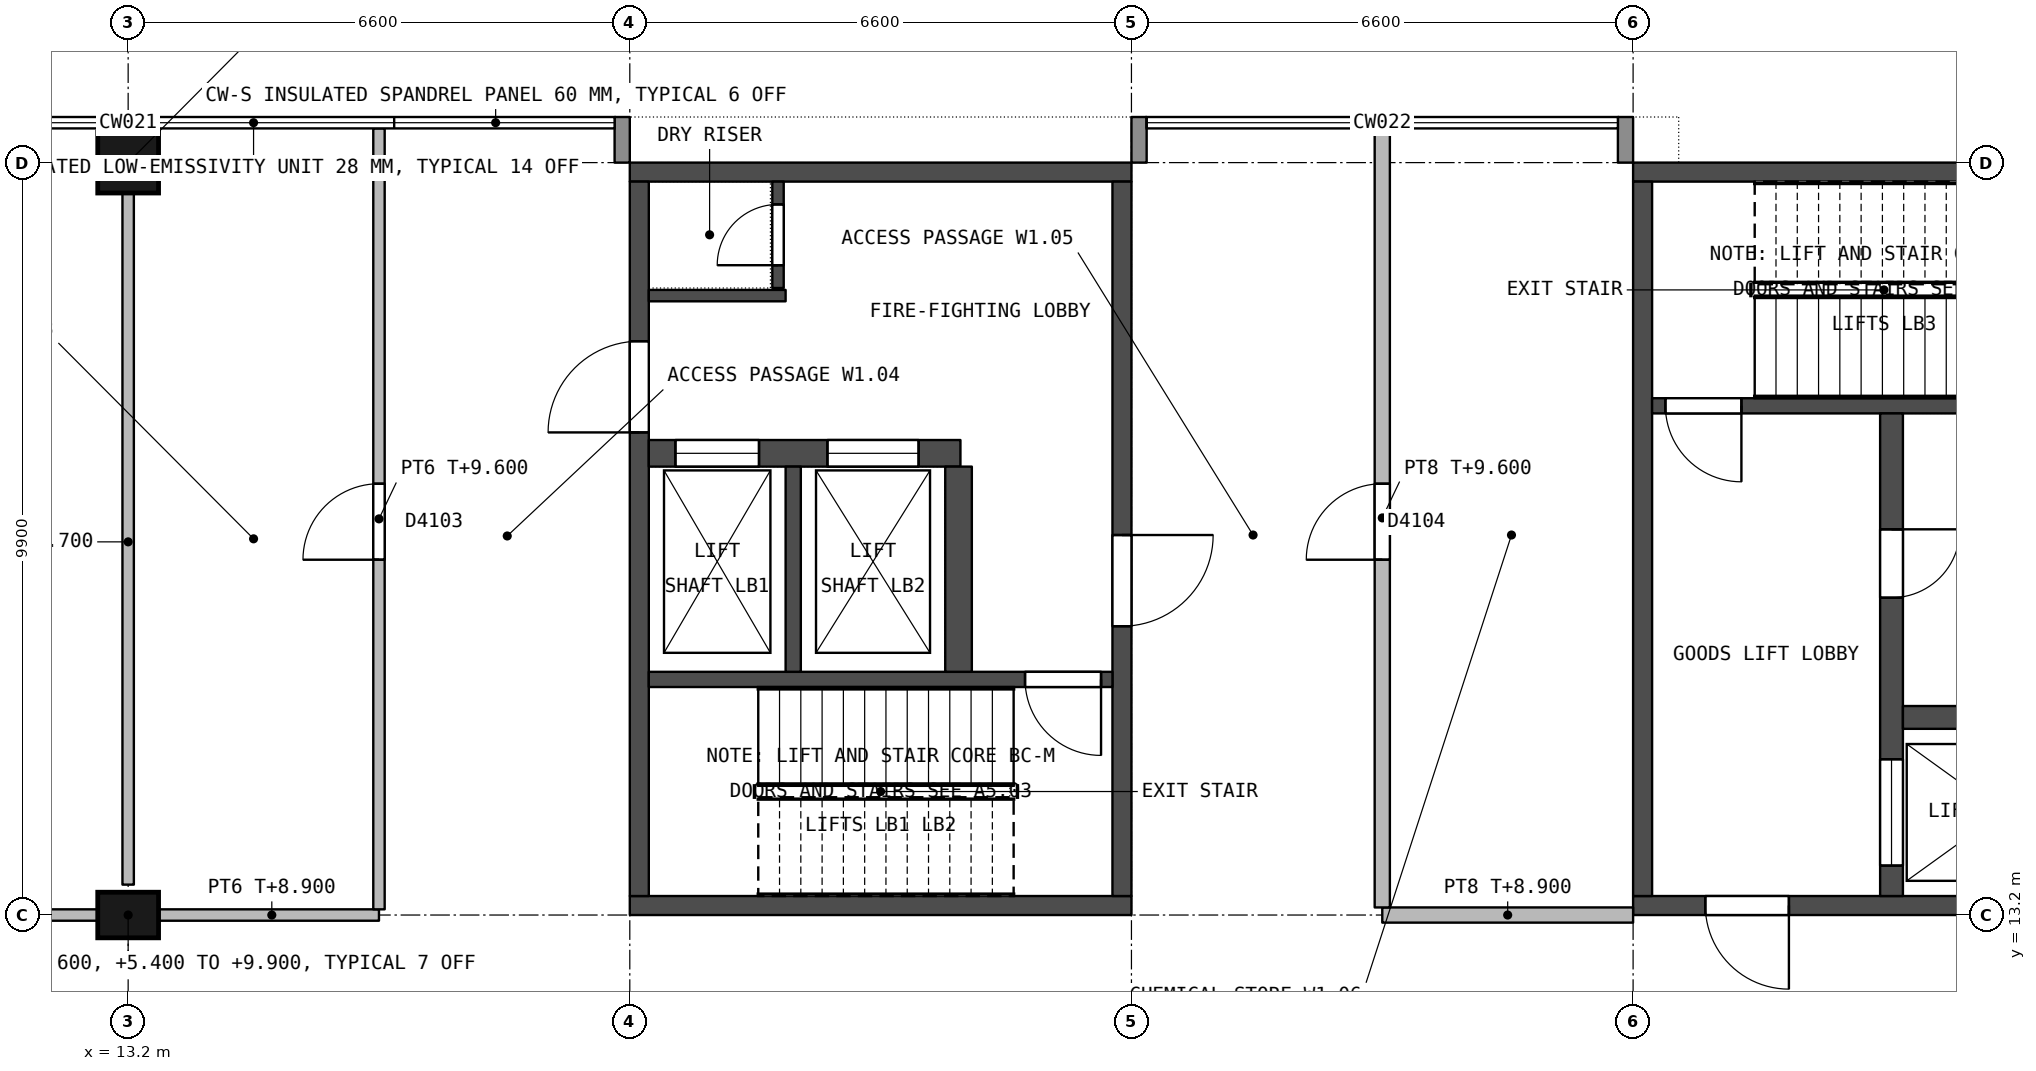
"""IFC4 building model, lengths in metres.
Left out: names, types, materials, properties, quantities, classifications, styles, units other than length and angle.
Written with IfcOpenShell. Run it as: python <this file> out.ifc"""

import sys

from ifc_helpers import new_model, si_unit, direction, frame, frame_2d, origin, origin_2d, place, context, subcontext, project, spatial, rectangle, extrude, element, fill, save


model = new_model("IFC4")
c1 = context("Model", 3, precision=1e-05, world=origin(), true_north=direction((0.0, 1.0)))
c2 = subcontext(c1, "Body", "Model", "MODEL_VIEW")
j1 = project(units=[si_unit("LENGTHUNIT", "METRE"), si_unit("PLANEANGLEUNIT", "RADIAN")], contexts=[c1])
p1 = place(None, origin())
s1 = spatial("IfcSite", under=j1, at=p1, CompositionType="ELEMENT")
p2 = place(p1, origin())
s2 = spatial("IfcBuilding", under=s1, at=p2, CompositionType="ELEMENT")
p3 = place(p2, frame((0.0, 0.0, 5.4)))
s3 = spatial("IfcBuildingStorey", under=s2, at=p3, CompositionType="ELEMENT", Elevation=5.4)
p4 = place(p3, frame((13.2, 13.2, 0.0), z_axis=(0.0, 0.0, 1.0), x_axis=(1.0, 0.0, 0.0)))
e1 = element("IfcColumn", 1, at=p4, inside=s3, PredefinedType="COLUMN", context=c2, shape_type="SweptSolid", body=[
    extrude(rectangle(XDim=0.8, YDim=0.6, at=origin_2d()), origin(), (0.0, 0.0, 1.0), 4.5),
])
p5 = place(p3, frame((13.2, 23.1, 0.0), z_axis=(0.0, 0.0, 1.0), x_axis=(1.0, 0.0, 0.0)))
e2 = element("IfcColumn", 2, at=p5, inside=s3, PredefinedType="COLUMN", context=c2, shape_type="SweptSolid", body=[
    extrude(rectangle(XDim=0.8, YDim=0.8, at=origin_2d()), origin(), (0.0, 0.0, 1.0), 4.5),
])
for number, where, z_axis, x_axis in (
    (3, (19.8, 13.325, 0.0), (0.0, 0.0, 1.0), (1.0, 0.0, 0.0)),
    (4, (19.8, 22.975, 0.0), (0.0, 0.0, 1.0), (1.0, 0.0, 0.0)),
):
    element("IfcWall", number, at=place(p3, frame(where, z_axis=z_axis, x_axis=x_axis)), inside=s3, PredefinedType="SHEAR", context=c2, shape_type="SweptSolid", body=[
        extrude(rectangle(XDim=6.6, YDim=0.25, at=frame_2d((3.3, 0.0))), origin(), (0.0, 0.0, 1.0), 4.2),
    ])
p6 = place(p3, frame((19.925, 13.45, 0.0), z_axis=(0.0, 0.0, 1.0), x_axis=(0.0, 1.0, 0.0)))
e5 = element("IfcWall", 5, at=p6, inside=s3, PredefinedType="SHEAR", context=c2, shape_type="SweptSolid", body=[
    extrude(rectangle(XDim=9.4, YDim=0.25, at=frame_2d((4.7, 0.0))), origin(), (0.0, 0.0, 1.0), 4.2),
])
p7 = place(p6, frame((6.1, 0.0, 0.0)))
e6 = element("IfcOpeningElement", 6, at=p7, cuts=e5, PredefinedType="OPENING", context=c2, shape_type="SweptSolid", body=[
    extrude(rectangle(XDim=1.2, YDim=2.1, at=frame_2d((0.6, 1.05))), frame((0.0, 0.135, 0.0), z_axis=(0.0, -1.0, 0.0), x_axis=(1.0, 0.0, 0.0)), (0.0, 0.0, 1.0), 0.27),
])
p8 = place(p3, frame((26.275, 13.45, 0.0), z_axis=(0.0, 0.0, 1.0), x_axis=(0.0, 1.0, 0.0)))
e7 = element("IfcWall", 7, at=p8, inside=s3, PredefinedType="SHEAR", context=c2, shape_type="SweptSolid", body=[
    extrude(rectangle(XDim=9.4, YDim=0.25, at=frame_2d((4.7, 0.0))), origin(), (0.0, 0.0, 1.0), 4.2),
])
p9 = place(p8, frame((3.55, 0.0, 0.0)))
e8 = element("IfcOpeningElement", 8, at=p9, cuts=e7, PredefinedType="OPENING", context=c2, shape_type="SweptSolid", body=[
    extrude(rectangle(XDim=1.2, YDim=2.1, at=frame_2d((0.6, 1.05))), frame((0.0, 0.135, 0.0), z_axis=(0.0, -1.0, 0.0), x_axis=(1.0, 0.0, 0.0)), (0.0, 0.0, 1.0), 0.27),
])
p10 = place(p3, frame((20.05, 16.3, 0.0), z_axis=(0.0, 0.0, 1.0), x_axis=(1.0, 0.0, 0.0)))
e9 = element("IfcWall", 9, at=p10, inside=s3, PredefinedType="SHEAR", context=c2, shape_type="SweptSolid", body=[
    extrude(rectangle(XDim=6.1, YDim=0.2, at=frame_2d((3.05, 0.0))), origin(), (0.0, 0.0, 1.0), 4.2),
])
p11 = place(p10, frame((4.95, 0.0, 0.0)))
e10 = element("IfcOpeningElement", 10, at=p11, cuts=e9, PredefinedType="OPENING", context=c2, shape_type="SweptSolid", body=[
    extrude(rectangle(XDim=1.0, YDim=2.2, at=frame_2d((0.5, 1.1))), frame((0.0, 0.11, 0.0), z_axis=(0.0, -1.0, 0.0), x_axis=(1.0, 0.0, 0.0)), (0.0, 0.0, 1.0), 0.22),
])
p12 = place(p3, frame((20.05, 19.275, 0.0), z_axis=(0.0, 0.0, 1.0), x_axis=(1.0, 0.0, 0.0)))
e11 = element("IfcWall", 11, at=p12, inside=s3, PredefinedType="SHEAR", context=c2, shape_type="SweptSolid", body=[
    extrude(rectangle(XDim=4.1, YDim=0.35, at=frame_2d((2.05, 0.0))), origin(), (0.0, 0.0, 1.0), 4.2),
])
p13 = place(p12, frame((0.35, 0.0, 0.0)))
e12 = element("IfcOpeningElement", 12, at=p13, cuts=e11, PredefinedType="OPENING", context=c2, shape_type="SweptSolid", body=[
    extrude(rectangle(XDim=1.1, YDim=2.2, at=frame_2d((0.55, 1.1))), frame((0.0, 0.185, 0.0), z_axis=(0.0, -1.0, 0.0), x_axis=(1.0, 0.0, 0.0)), (0.0, 0.0, 1.0), 0.37),
])
p14 = place(p12, frame((2.35, 0.0, 0.0)))
e13 = element("IfcOpeningElement", 13, at=p14, cuts=e11, PredefinedType="OPENING", context=c2, shape_type="SweptSolid", body=[
    extrude(rectangle(XDim=1.2, YDim=2.3, at=frame_2d((0.6, 1.15))), frame((0.0, 0.185, 0.0), z_axis=(0.0, -1.0, 0.0), x_axis=(1.0, 0.0, 0.0)), (0.0, 0.0, 1.0), 0.37),
])
p15 = place(p3, frame((21.95, 16.4, 0.0), z_axis=(0.0, 0.0, 1.0), x_axis=(0.0, 1.0, 0.0)))
e14 = element("IfcWall", 14, at=p15, inside=s3, PredefinedType="SHEAR", context=c2, shape_type="SweptSolid", body=[
    extrude(rectangle(XDim=2.7, YDim=0.2, at=frame_2d((1.35, 0.0))), origin(), (0.0, 0.0, 1.0), 4.2),
])
p16 = place(p3, frame((24.125, 16.4, 0.0), z_axis=(0.0, 0.0, 1.0), x_axis=(0.0, 1.0, 0.0)))
e15 = element("IfcWall", 15, at=p16, inside=s3, PredefinedType="SHEAR", context=c2, shape_type="SweptSolid", body=[
    extrude(rectangle(XDim=2.7, YDim=0.35, at=frame_2d((1.35, 0.0))), origin(), (0.0, 0.0, 1.0), 4.2),
])
p17 = place(p3, frame((20.05, 21.35, 0.0), z_axis=(0.0, 0.0, 1.0), x_axis=(1.0, 0.0, 0.0)))
e16 = element("IfcWall", 16, at=p17, inside=s3, PredefinedType="SHEAR", context=c2, shape_type="SweptSolid", body=[
    extrude(rectangle(XDim=1.8, YDim=0.15, at=frame_2d((0.9, 0.0))), origin(), (0.0, 0.0, 1.0), 4.2),
])
p18 = place(p3, frame((21.75, 21.45, 0.0), z_axis=(0.0, 0.0, 1.0), x_axis=(0.0, 1.0, 0.0)))
e17 = element("IfcWall", 17, at=p18, inside=s3, PredefinedType="SHEAR", context=c2, shape_type="SweptSolid", body=[
    extrude(rectangle(XDim=1.4, YDim=0.15, at=frame_2d((0.7, 0.0))), origin(), (0.0, 0.0, 1.0), 4.2),
])
p19 = place(p18, frame((0.3, 0.0, 0.0)))
e18 = element("IfcOpeningElement", 18, at=p19, cuts=e17, PredefinedType="OPENING", context=c2, shape_type="SweptSolid", body=[
    extrude(rectangle(XDim=0.8, YDim=2.0, at=frame_2d((0.4, 1.0))), frame((0.0, 0.085, 0.0), z_axis=(0.0, -1.0, 0.0), x_axis=(1.0, 0.0, 0.0)), (0.0, 0.0, 1.0), 0.17),
])
p20 = place(p3, frame((33.0, 13.325, 0.0), z_axis=(0.0, 0.0, 1.0), x_axis=(1.0, 0.0, 0.0)))
e19 = element("IfcWall", 19, at=p20, inside=s3, PredefinedType="SHEAR", context=c2, shape_type="SweptSolid", body=[
    extrude(rectangle(XDim=6.6, YDim=0.25, at=frame_2d((3.3, 0.0))), origin(), (0.0, 0.0, 1.0), 4.2),
])
p21 = place(p20, frame((0.95, 0.0, 0.0)))
e20 = element("IfcOpeningElement", 20, at=p21, cuts=e19, PredefinedType="OPENING", context=c2, shape_type="SweptSolid", body=[
    extrude(rectangle(XDim=1.1, YDim=2.1, at=frame_2d((0.55, 1.05))), frame((0.0, 0.135, 0.0), z_axis=(0.0, -1.0, 0.0), x_axis=(1.0, 0.0, 0.0)), (0.0, 0.0, 1.0), 0.27),
])
p22 = place(p3, frame((33.0, 22.975, 0.0), z_axis=(0.0, 0.0, 1.0), x_axis=(1.0, 0.0, 0.0)))
e21 = element("IfcWall", 21, at=p22, inside=s3, PredefinedType="SHEAR", context=c2, shape_type="SweptSolid", body=[
    extrude(rectangle(XDim=6.6, YDim=0.25, at=frame_2d((3.3, 0.0))), origin(), (0.0, 0.0, 1.0), 4.2),
])
p23 = place(p3, frame((33.125, 13.45, 0.0), z_axis=(0.0, 0.0, 1.0), x_axis=(0.0, 1.0, 0.0)))
e22 = element("IfcWall", 22, at=p23, inside=s3, PredefinedType="SHEAR", context=c2, shape_type="SweptSolid", body=[
    extrude(rectangle(XDim=9.4, YDim=0.25, at=frame_2d((4.7, 0.0))), origin(), (0.0, 0.0, 1.0), 4.2),
])
p24 = place(p3, frame((33.25, 19.9, 0.0), z_axis=(0.0, 0.0, 1.0), x_axis=(1.0, 0.0, 0.0)))
e23 = element("IfcWall", 23, at=p24, inside=s3, PredefinedType="SHEAR", context=c2, shape_type="SweptSolid", body=[
    extrude(rectangle(XDim=6.1, YDim=0.2, at=frame_2d((3.05, 0.0))), origin(), (0.0, 0.0, 1.0), 4.2),
])
p25 = place(p24, frame((0.175, 0.0, 0.0)))
e24 = element("IfcOpeningElement", 24, at=p25, cuts=e23, PredefinedType="OPENING", context=c2, shape_type="SweptSolid", body=[
    extrude(rectangle(XDim=1.0, YDim=2.1, at=frame_2d((0.5, 1.05))), frame((0.0, 0.11, 0.0), z_axis=(0.0, -1.0, 0.0), x_axis=(1.0, 0.0, 0.0)), (0.0, 0.0, 1.0), 0.22),
])
p26 = place(p3, frame((36.4, 13.45, 0.0), z_axis=(0.0, 0.0, 1.0), x_axis=(0.0, 1.0, 0.0)))
e25 = element("IfcWall", 25, at=p26, inside=s3, PredefinedType="SHEAR", context=c2, shape_type="SweptSolid", body=[
    extrude(rectangle(XDim=6.35, YDim=0.3, at=frame_2d((3.175, 0.0))), origin(), (0.0, 0.0, 1.0), 4.2),
])
p27 = place(p26, frame((3.925, 0.0, 0.0)))
e26 = element("IfcOpeningElement", 26, at=p27, cuts=e25, PredefinedType="OPENING", context=c2, shape_type="SweptSolid", body=[
    extrude(rectangle(XDim=0.9, YDim=2.1, at=frame_2d((0.45, 1.05))), frame((0.0, 0.16, 0.0), z_axis=(0.0, -1.0, 0.0), x_axis=(1.0, 0.0, 0.0)), (0.0, 0.0, 1.0), 0.32),
])
p28 = place(p26, frame((0.4, 0.0, 0.0)))
e27 = element("IfcOpeningElement", 27, at=p28, cuts=e25, PredefinedType="OPENING", context=c2, shape_type="SweptSolid", body=[
    extrude(rectangle(XDim=1.4, YDim=2.4, at=frame_2d((0.7, 1.2))), frame((0.0, 0.16, 0.0), z_axis=(0.0, -1.0, 0.0), x_axis=(1.0, 0.0, 0.0)), (0.0, 0.0, 1.0), 0.32),
])
p29 = place(p3, frame((36.55, 15.8, 0.0), z_axis=(0.0, 0.0, 1.0), x_axis=(1.0, 0.0, 0.0)))
e28 = element("IfcWall", 28, at=p29, inside=s3, PredefinedType="SHEAR", context=c2, shape_type="SweptSolid", body=[
    extrude(rectangle(XDim=2.8, YDim=0.3, at=frame_2d((1.4, 0.0))), origin(), (0.0, 0.0, 1.0), 4.2),
])
for number, where, z_axis, x_axis in (
    (29, (19.7, 23.1, 0.0), (0.0, 0.0, 1.0), (0.0, 1.0, 0.0)),
    (30, (26.5, 23.1, 0.0), (0.0, 0.0, 1.0), (0.0, 1.0, 0.0)),
    (31, (32.9, 23.1, 0.0), (0.0, 0.0, 1.0), (0.0, 1.0, 0.0)),
):
    element("IfcWall", number, at=place(p3, frame(where, z_axis=z_axis, x_axis=x_axis)), inside=s3, PredefinedType="STANDARD", context=c2, shape_type="SweptSolid", body=[
        extrude(rectangle(XDim=0.6, YDim=0.2, at=frame_2d((0.3, 0.0))), origin(), (0.0, 0.0, 1.0), 3.5),
    ])
p30 = place(p3, frame((12.8, 13.2, 0.0), z_axis=(0.0, 0.0, 1.0), x_axis=(-1.0, 0.0, 0.0)))
e32 = element("IfcWall", 32, at=p30, inside=s3, PredefinedType="PARTITIONING", context=c2, shape_type="SweptSolid", body=[
    extrude(rectangle(XDim=6.2, YDim=0.15, at=frame_2d((3.1, 0.0))), origin(), (0.0, 0.0, 1.0), 3.5),
])
p31 = place(p30, frame((2.15, 0.0, 0.0)))
e33 = element("IfcOpeningElement", 33, at=p31, cuts=e32, PredefinedType="OPENING", context=c2, shape_type="SweptSolid", body=[
    extrude(rectangle(XDim=1.5, YDim=2.1, at=frame_2d((0.75, 1.05))), frame((0.0, 0.085, 0.0), z_axis=(0.0, -1.0, 0.0), x_axis=(1.0, 0.0, 0.0)), (0.0, 0.0, 1.0), 0.17),
])
p32 = place(p3, frame((16.5, 13.2, 0.0), z_axis=(0.0, 0.0, 1.0), x_axis=(-1.0, 0.0, 0.0)))
e34 = element("IfcWall", 34, at=p32, inside=s3, PredefinedType="PARTITIONING", context=c2, shape_type="SweptSolid", body=[
    extrude(rectangle(XDim=2.9, YDim=0.15, at=frame_2d((1.45, 0.0))), origin(), (0.0, 0.0, 1.0), 3.5),
])
p33 = place(p3, frame((33.0, 13.2, 0.0), z_axis=(0.0, 0.0, 1.0), x_axis=(-1.0, 0.0, 0.0)))
e35 = element("IfcWall", 35, at=p33, inside=s3, PredefinedType="PARTITIONING", context=c2, shape_type="SweptSolid", body=[
    extrude(rectangle(XDim=3.3, YDim=0.2, at=frame_2d((1.65, 0.0))), origin(), (0.0, 0.0, 1.0), 3.5),
])
p34 = place(p3, frame((13.2, 13.6, 0.0), z_axis=(0.0, 0.0, 1.0), x_axis=(0.0, 1.0, 0.0)))
e36 = element("IfcWall", 36, at=p34, inside=s3, PredefinedType="PARTITIONING", context=c2, shape_type="SweptSolid", body=[
    extrude(rectangle(XDim=9.1, YDim=0.15, at=frame_2d((4.55, 0.0))), origin(), (0.0, 0.0, 1.0), 3.3),
])
p35 = place(p3, frame((16.5, 13.275, 0.0), z_axis=(0.0, 0.0, 1.0), x_axis=(0.0, 1.0, 0.0)))
e37 = element("IfcWall", 37, at=p35, inside=s3, PredefinedType="PARTITIONING", context=c2, shape_type="SweptSolid", body=[
    extrude(rectangle(XDim=10.275, YDim=0.15, at=frame_2d((5.138, 0.0))), origin(), (0.0, 0.0, 1.0), 4.2),
])
p36 = place(p35, frame((4.6, 0.0, 0.0)))
e38 = element("IfcOpeningElement", 38, at=p36, cuts=e37, PredefinedType="OPENING", context=c2, shape_type="SweptSolid", body=[
    extrude(rectangle(XDim=1.0, YDim=2.1, at=frame_2d((0.5, 1.05))), frame((0.0, 0.085, 0.0), z_axis=(0.0, -1.0, 0.0), x_axis=(1.0, 0.0, 0.0)), (0.0, 0.0, 1.0), 0.17),
])
p37 = place(p3, frame((29.7, 13.3, 0.0), z_axis=(0.0, 0.0, 1.0), x_axis=(0.0, 1.0, 0.0)))
e39 = element("IfcWall", 39, at=p37, inside=s3, PredefinedType="PARTITIONING", context=c2, shape_type="SweptSolid", body=[
    extrude(rectangle(XDim=10.25, YDim=0.2, at=frame_2d((5.125, 0.0))), origin(), (0.0, 0.0, 1.0), 4.2),
])
p38 = place(p37, frame((4.575, 0.0, 0.0)))
e40 = element("IfcOpeningElement", 40, at=p38, cuts=e39, PredefinedType="OPENING", context=c2, shape_type="SweptSolid", body=[
    extrude(rectangle(XDim=1.0, YDim=2.1, at=frame_2d((0.5, 1.05))), frame((0.0, 0.11, 0.0), z_axis=(0.0, -1.0, 0.0), x_axis=(1.0, 0.0, 0.0)), (0.0, 0.0, 1.0), 0.22),
])
p39 = place(p9, origin())
e41 = element("IfcDoor", 41, at=p39, inside=s3, OperationType="SINGLE_SWING_RIGHT", PredefinedType="DOOR", context=c2, shape_type="SweptSolid", body=[
    extrude(rectangle(XDim=1.2, YDim=2.1, at=frame_2d((0.6, 1.05))), frame((0.0, 0.025, 0.0), z_axis=(0.0, -1.0, 0.0), x_axis=(1.0, 0.0, 0.0)), (0.0, 0.0, 1.0), 0.05),
])
fill(e8, e41)
p40 = place(p7, origin())
e42 = element("IfcDoor", 42, at=p40, inside=s3, OperationType="SINGLE_SWING_LEFT", PredefinedType="DOOR", context=c2, shape_type="SweptSolid", body=[
    extrude(rectangle(XDim=1.2, YDim=2.1, at=frame_2d((0.6, 1.05))), frame((0.0, 0.025, 0.0), z_axis=(0.0, -1.0, 0.0), x_axis=(1.0, 0.0, 0.0)), (0.0, 0.0, 1.0), 0.05),
])
fill(e6, e42)
p41 = place(p11, origin())
e43 = element("IfcDoor", 43, at=p41, inside=s3, OperationType="SINGLE_SWING_RIGHT", PredefinedType="DOOR", context=c2, shape_type="SweptSolid", body=[
    extrude(rectangle(XDim=1.0, YDim=2.2, at=frame_2d((0.5, 1.1))), frame((0.0, 0.025, 0.0), z_axis=(0.0, -1.0, 0.0), x_axis=(1.0, 0.0, 0.0)), (0.0, 0.0, 1.0), 0.05),
])
fill(e10, e43)
p42 = place(p19, origin())
e44 = element("IfcDoor", 44, at=p42, inside=s3, OperationType="SINGLE_SWING_LEFT", PredefinedType="DOOR", context=c2, shape_type="SweptSolid", body=[
    extrude(rectangle(XDim=0.8, YDim=2.0, at=frame_2d((0.4, 1.0))), frame((0.0, 0.025, 0.0), z_axis=(0.0, -1.0, 0.0), x_axis=(1.0, 0.0, 0.0)), (0.0, 0.0, 1.0), 0.05),
])
fill(e18, e44)
p43 = place(p13, origin())
e45 = element("IfcDoor", 45, at=p43, inside=s3, OperationType="DOUBLE_DOOR_SLIDING", PredefinedType="NOTDEFINED", context=c2, shape_type="SweptSolid", body=[
    extrude(rectangle(XDim=1.1, YDim=2.2, at=frame_2d((0.55, 1.1))), frame((0.0, 0.025, 0.0), z_axis=(0.0, -1.0, 0.0), x_axis=(1.0, 0.0, 0.0)), (0.0, 0.0, 1.0), 0.05),
])
fill(e12, e45)
p44 = place(p14, origin())
e46 = element("IfcDoor", 46, at=p44, inside=s3, OperationType="DOUBLE_DOOR_SLIDING", PredefinedType="NOTDEFINED", context=c2, shape_type="SweptSolid", body=[
    extrude(rectangle(XDim=1.2, YDim=2.3, at=frame_2d((0.6, 1.15))), frame((0.0, 0.025, 0.0), z_axis=(0.0, -1.0, 0.0), x_axis=(1.0, 0.0, 0.0)), (0.0, 0.0, 1.0), 0.05),
])
fill(e13, e46)
p45 = place(p27, origin())
e47 = element("IfcDoor", 47, at=p45, inside=s3, OperationType="SINGLE_SWING_RIGHT", PredefinedType="DOOR", context=c2, shape_type="SweptSolid", body=[
    extrude(rectangle(XDim=0.9, YDim=2.1, at=frame_2d((0.45, 1.05))), frame((0.0, 0.025, 0.0), z_axis=(0.0, -1.0, 0.0), x_axis=(1.0, 0.0, 0.0)), (0.0, 0.0, 1.0), 0.05),
])
fill(e26, e47)
p46 = place(p21, origin())
e48 = element("IfcDoor", 48, at=p46, inside=s3, OperationType="SINGLE_SWING_RIGHT", PredefinedType="DOOR", context=c2, shape_type="SweptSolid", body=[
    extrude(rectangle(XDim=1.1, YDim=2.1, at=frame_2d((0.55, 1.05))), frame((0.0, 0.025, 0.0), z_axis=(0.0, -1.0, 0.0), x_axis=(1.0, 0.0, 0.0)), (0.0, 0.0, 1.0), 0.05),
])
fill(e20, e48)
p47 = place(p25, origin())
e49 = element("IfcDoor", 49, at=p47, inside=s3, OperationType="SINGLE_SWING_RIGHT", PredefinedType="DOOR", context=c2, shape_type="SweptSolid", body=[
    extrude(rectangle(XDim=1.0, YDim=2.1, at=frame_2d((0.5, 1.05))), frame((0.0, 0.025, 0.0), z_axis=(0.0, -1.0, 0.0), x_axis=(1.0, 0.0, 0.0)), (0.0, 0.0, 1.0), 0.05),
])
fill(e24, e49)
p48 = place(p28, origin())
e50 = element("IfcDoor", 50, at=p48, inside=s3, OperationType="DOUBLE_DOOR_SLIDING", PredefinedType="NOTDEFINED", context=c2, shape_type="SweptSolid", body=[
    extrude(rectangle(XDim=1.4, YDim=2.4, at=frame_2d((0.7, 1.2))), frame((0.0, 0.025, 0.0), z_axis=(0.0, -1.0, 0.0), x_axis=(1.0, 0.0, 0.0)), (0.0, 0.0, 1.0), 0.05),
])
fill(e27, e50)
p49 = place(p36, origin())
e51 = element("IfcDoor", 51, at=p49, inside=s3, OperationType="SINGLE_SWING_LEFT", PredefinedType="DOOR", context=c2, shape_type="SweptSolid", body=[
    extrude(rectangle(XDim=1.0, YDim=2.1, at=frame_2d((0.5, 1.05))), frame((0.0, 0.027, 0.0), z_axis=(0.0, -1.0, 0.0), x_axis=(1.0, 0.0, 0.0)), (0.0, 0.0, 1.0), 0.054),
])
fill(e38, e51)
p50 = place(p38, origin())
e52 = element("IfcDoor", 52, at=p50, inside=s3, OperationType="SINGLE_SWING_LEFT", PredefinedType="DOOR", context=c2, shape_type="SweptSolid", body=[
    extrude(rectangle(XDim=1.0, YDim=2.1, at=frame_2d((0.5, 1.05))), frame((0.0, 0.03, 0.0), z_axis=(0.0, -1.0, 0.0), x_axis=(1.0, 0.0, 0.0)), (0.0, 0.0, 1.0), 0.06),
])
fill(e40, e52)
save(model, sys.argv[1])
